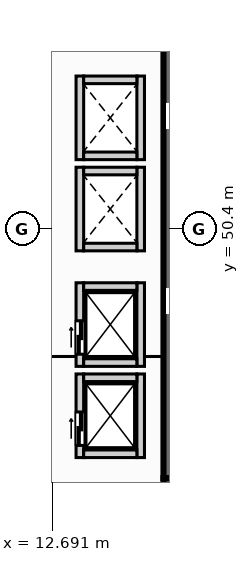
"""IFC4 building model, lengths in metres.
Left out: names, types, materials, properties, quantities, classifications, styles, units other than length and angle.
Written with IfcOpenShell. Run it as: python <this file> out.ifc"""

import sys

from ifc_helpers import new_model, si_unit, direction, frame, frame_2d, origin, place, context, subcontext, project, spatial, rectangle, extrude, element, fill, save


model = new_model("IFC4")
c1 = context("Model", 3, precision=1e-05, world=origin(), true_north=direction((0.0, 1.0)))
c2 = subcontext(c1, "Body", "Model", "MODEL_VIEW")
j1 = project(units=[si_unit("LENGTHUNIT", "METRE"), si_unit("PLANEANGLEUNIT", "RADIAN")], contexts=[c1])
p1 = place(None, origin())
s1 = spatial("IfcSite", under=j1, at=p1, CompositionType="ELEMENT")
p2 = place(p1, origin())
s2 = spatial("IfcBuilding", under=s1, at=p2, CompositionType="ELEMENT")
p3 = place(p2, frame((0.0, 0.0, 15.6)))
s3 = spatial("IfcBuildingStorey", under=s2, at=p3, CompositionType="ELEMENT", Elevation=15.6)
p4 = place(p3, frame((16.35, 41.75, 0.0), z_axis=(0.0, 0.0, 1.0), x_axis=(1.0, 0.0, 0.0)))
e1 = element("IfcWall", 1, at=p4, inside=s3, PredefinedType="SHEAR", context=c2, shape_type="SweptSolid", body=[
    extrude(rectangle(XDim=1.65, YDim=0.9, at=frame_2d((0.825, 0.0))), origin(), (0.0, 0.0, 1.0), 4.85),
])
p5 = place(p3, frame((16.8, 42.2, 0.0), z_axis=(0.0, 0.0, 1.0), x_axis=(0.0, 1.0, 0.0)))
e2 = element("IfcWall", 2, at=p5, inside=s3, PredefinedType="SHEAR", context=c2, shape_type="SweptSolid", body=[
    extrude(rectangle(XDim=16.35, YDim=0.9, at=frame_2d((8.175, 0.0))), origin(), (0.0, 0.0, 1.0), 4.85),
])
p6 = place(p3, frame((13.6, 42.875, 0.0), z_axis=(0.0, 0.0, 1.0), x_axis=(0.0, 1.0, 0.0)))
e3 = element("IfcWall", 3, at=p6, inside=s3, PredefinedType="SOLIDWALL", context=c2, shape_type="SweptSolid", body=[
    extrude(rectangle(XDim=2.75, YDim=0.25, at=frame_2d((1.375, 0.0))), origin(), (0.0, 0.0, 1.0), 4.85),
])
p7 = place(p6, frame((0.4, 0.0, 0.0)))
e4 = element("IfcOpeningElement", 4, at=p7, cuts=e3, PredefinedType="OPENING", context=c2, shape_type="SweptSolid", body=[
    extrude(rectangle(XDim=1.1, YDim=2.15, at=frame_2d((0.55, 1.075))), frame((0.0, 0.135, 0.0), z_axis=(0.0, -1.0, 0.0), x_axis=(1.0, 0.0, 0.0)), (0.0, 0.0, 1.0), 0.27),
])
p8 = place(p3, frame((15.6, 42.875, 0.0), z_axis=(0.0, 0.0, 1.0), x_axis=(0.0, 1.0, 0.0)))
e5 = element("IfcWall", 5, at=p8, inside=s3, PredefinedType="SOLIDWALL", context=c2, shape_type="SweptSolid", body=[
    extrude(rectangle(XDim=2.75, YDim=0.25, at=frame_2d((1.375, 0.0))), origin(), (0.0, 0.0, 1.0), 4.85),
])
for number, where, z_axis, x_axis in (
    (6, (13.725, 43.0, 0.0), (0.0, 0.0, 1.0), (1.0, 0.0, 0.0)),
    (7, (13.725, 45.5, 0.0), (0.0, 0.0, 1.0), (1.0, 0.0, 0.0)),
):
    element("IfcWall", number, at=place(p3, frame(where, z_axis=z_axis, x_axis=x_axis)), inside=s3, PredefinedType="SOLIDWALL", context=c2, shape_type="SweptSolid", body=[
        extrude(rectangle(XDim=1.75, YDim=0.25, at=frame_2d((0.875, 0.0))), origin(), (0.0, 0.0, 1.0), 4.85),
    ])
p9 = place(p3, frame((13.6, 45.875, 0.0), z_axis=(0.0, 0.0, 1.0), x_axis=(0.0, 1.0, 0.0)))
e8 = element("IfcWall", 8, at=p9, inside=s3, PredefinedType="SOLIDWALL", context=c2, shape_type="SweptSolid", body=[
    extrude(rectangle(XDim=2.75, YDim=0.25, at=frame_2d((1.375, 0.0))), origin(), (0.0, 0.0, 1.0), 4.85),
])
p10 = place(p9, frame((0.4, 0.0, 0.0)))
e9 = element("IfcOpeningElement", 9, at=p10, cuts=e8, PredefinedType="OPENING", context=c2, shape_type="SweptSolid", body=[
    extrude(rectangle(XDim=1.1, YDim=2.15, at=frame_2d((0.55, 1.075))), frame((0.0, 0.135, 0.0), z_axis=(0.0, -1.0, 0.0), x_axis=(1.0, 0.0, 0.0)), (0.0, 0.0, 1.0), 0.27),
])
p11 = place(p3, frame((15.6, 45.875, 0.0), z_axis=(0.0, 0.0, 1.0), x_axis=(0.0, 1.0, 0.0)))
e10 = element("IfcWall", 10, at=p11, inside=s3, PredefinedType="SOLIDWALL", context=c2, shape_type="SweptSolid", body=[
    extrude(rectangle(XDim=2.75, YDim=0.25, at=frame_2d((1.375, 0.0))), origin(), (0.0, 0.0, 1.0), 4.85),
])
for number, where, z_axis, x_axis in (
    (11, (13.725, 46.0, 0.0), (0.0, 0.0, 1.0), (1.0, 0.0, 0.0)),
    (12, (13.725, 48.5, 0.0), (0.0, 0.0, 1.0), (1.0, 0.0, 0.0)),
):
    element("IfcWall", number, at=place(p3, frame(where, z_axis=z_axis, x_axis=x_axis)), inside=s3, PredefinedType="SOLIDWALL", context=c2, shape_type="SweptSolid", body=[
        extrude(rectangle(XDim=1.75, YDim=0.25, at=frame_2d((0.875, 0.0))), origin(), (0.0, 0.0, 1.0), 4.85),
    ])
for number, where, z_axis, x_axis in (
    (13, (13.6, 49.675, 0.0), (0.0, 0.0, 1.0), (0.0, 1.0, 0.0)),
    (14, (15.6, 49.675, 0.0), (0.0, 0.0, 1.0), (0.0, 1.0, 0.0)),
):
    element("IfcWall", number, at=place(p3, frame(where, z_axis=z_axis, x_axis=x_axis)), inside=s3, PredefinedType="SOLIDWALL", context=c2, shape_type="SweptSolid", body=[
        extrude(rectangle(XDim=2.75, YDim=0.25, at=frame_2d((1.375, 0.0))), origin(), (0.0, 0.0, 1.0), 4.85),
    ])
for number, where, z_axis, x_axis in (
    (15, (13.725, 49.8, 0.0), (0.0, 0.0, 1.0), (1.0, 0.0, 0.0)),
    (16, (13.725, 52.3, 0.0), (0.0, 0.0, 1.0), (1.0, 0.0, 0.0)),
):
    element("IfcWall", number, at=place(p3, frame(where, z_axis=z_axis, x_axis=x_axis)), inside=s3, PredefinedType="SOLIDWALL", context=c2, shape_type="SweptSolid", body=[
        extrude(rectangle(XDim=1.75, YDim=0.25, at=frame_2d((0.875, 0.0))), origin(), (0.0, 0.0, 1.0), 4.85),
    ])
for number, where, z_axis, x_axis in (
    (17, (13.6, 52.675, 0.0), (0.0, 0.0, 1.0), (0.0, 1.0, 0.0)),
    (18, (15.6, 52.675, 0.0), (0.0, 0.0, 1.0), (0.0, 1.0, 0.0)),
):
    element("IfcWall", number, at=place(p3, frame(where, z_axis=z_axis, x_axis=x_axis)), inside=s3, PredefinedType="SOLIDWALL", context=c2, shape_type="SweptSolid", body=[
        extrude(rectangle(XDim=2.75, YDim=0.25, at=frame_2d((1.375, 0.0))), origin(), (0.0, 0.0, 1.0), 4.85),
    ])
for number, where, z_axis, x_axis in (
    (19, (13.725, 52.8, 0.0), (0.0, 0.0, 1.0), (1.0, 0.0, 0.0)),
    (20, (13.725, 55.3, 0.0), (0.0, 0.0, 1.0), (1.0, 0.0, 0.0)),
):
    element("IfcWall", number, at=place(p3, frame(where, z_axis=z_axis, x_axis=x_axis)), inside=s3, PredefinedType="SOLIDWALL", context=c2, shape_type="SweptSolid", body=[
        extrude(rectangle(XDim=1.75, YDim=0.25, at=frame_2d((0.875, 0.0))), origin(), (0.0, 0.0, 1.0), 4.85),
    ])
p12 = place(p7, origin())
e21 = element("IfcDoor", 21, at=p12, inside=s3, OperationType="SLIDING_TO_LEFT", PredefinedType="DOOR", context=c2, shape_type="SweptSolid", body=[
    extrude(rectangle(XDim=1.1, YDim=2.15, at=frame_2d((0.55, 1.075))), frame((0.0, 0.025, 0.0), z_axis=(0.0, -1.0, 0.0), x_axis=(1.0, 0.0, 0.0)), (0.0, 0.0, 1.0), 0.05),
])
fill(e4, e21)
p13 = place(p10, origin())
e22 = element("IfcDoor", 22, at=p13, inside=s3, OperationType="SLIDING_TO_LEFT", PredefinedType="DOOR", context=c2, shape_type="SweptSolid", body=[
    extrude(rectangle(XDim=1.1, YDim=2.15, at=frame_2d((0.55, 1.075))), frame((0.0, 0.025, 0.0), z_axis=(0.0, -1.0, 0.0), x_axis=(1.0, 0.0, 0.0)), (0.0, 0.0, 1.0), 0.05),
])
fill(e9, e22)
save(model, sys.argv[1])
